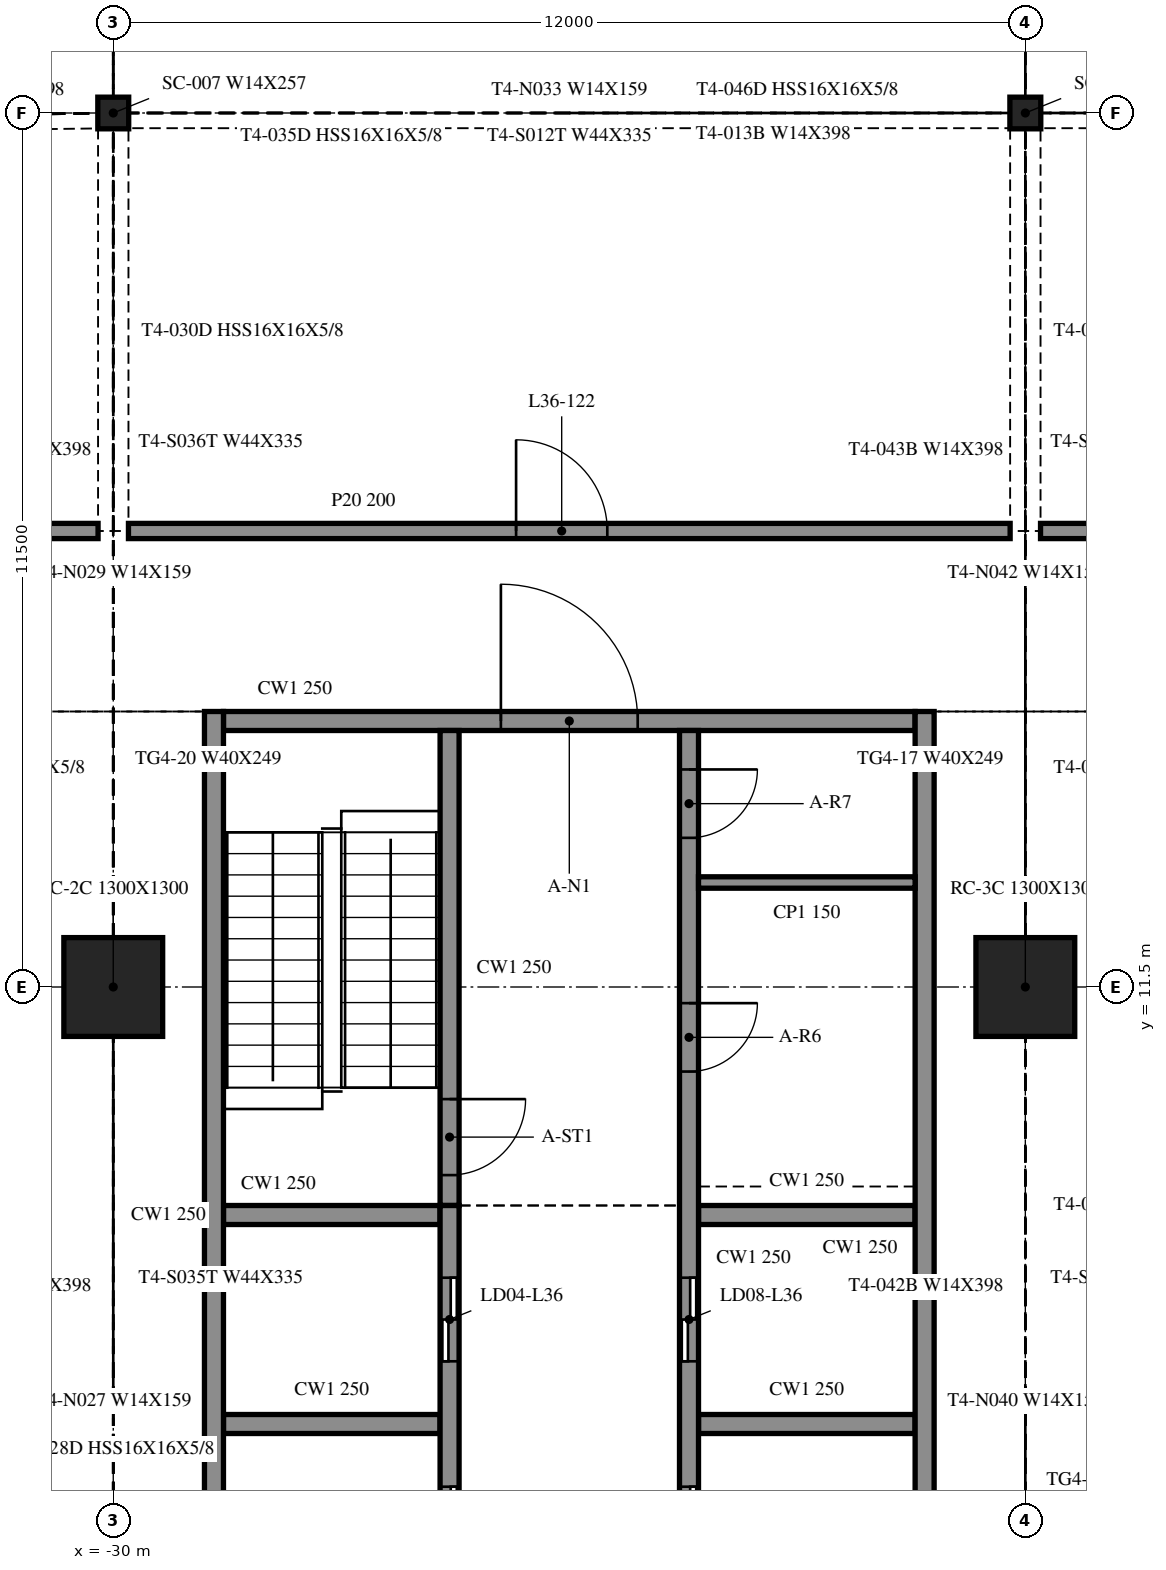
"""IFC4 building model, lengths in metres.
Left out: names, types, materials, properties, quantities, classifications, styles, units other than length and angle.
Written with IfcOpenShell. Run it as: python <this file> out.ifc"""

import sys

from ifc_helpers import new_model, si_unit, direction, frame, frame_2d, origin, origin_2d, place, context, subcontext, project, spatial, rectangle, i_section, extrude, element, fill, save


model = new_model("IFC4")
c1 = context("Model", 3, precision=1e-05, world=origin(), true_north=direction((0.0, 1.0)))
c2 = subcontext(c1, "Body", "Model", "MODEL_VIEW")
j1 = project(units=[si_unit("LENGTHUNIT", "METRE"), si_unit("PLANEANGLEUNIT", "RADIAN")], contexts=[c1])
p1 = place(None, origin())
s1 = spatial("IfcSite", under=j1, at=p1, CompositionType="ELEMENT")
p2 = place(p1, origin())
s2 = spatial("IfcBuilding", under=s1, at=p2, CompositionType="ELEMENT")
p3 = place(p2, frame((0.0, 0.0, 154.8)))
s3 = spatial("IfcBuildingStorey", under=s2, at=p3, CompositionType="ELEMENT", Elevation=154.8)
for number, where, z_axis, x_axis in (
    (1, (-30.0, 11.5, -0.55), (0.0, 0.0, 1.0), (1.0, 0.0, 0.0)),
    (2, (-18.0, 11.5, -0.55), (0.0, 0.0, 1.0), (1.0, 0.0, 0.0)),
):
    element("IfcColumn", number, at=place(p3, frame(where, z_axis=z_axis, x_axis=x_axis)), inside=s3, PredefinedType="COLUMN", context=c2, shape_type="SweptSolid", body=[
        extrude(rectangle(XDim=1.3, YDim=1.3, at=origin_2d()), origin(), (0.0, 0.0, 1.0), 4.61),
    ])
for number, where, z_axis, x_axis in (
    (3, (-18.0, 23.0, -0.55), (0.0, 0.0, 1.0), (1.0, 0.0, 0.0)),
    (4, (-30.0, 23.0, -0.55), (0.0, 0.0, 1.0), (1.0, 0.0, 0.0)),
):
    element("IfcColumn", number, at=place(p3, frame(where, z_axis=z_axis, x_axis=x_axis)), inside=s3, PredefinedType="COLUMN", context=c2, shape_type="SweptSolid", body=[
        extrude(i_section(OverallWidth=0.406, OverallDepth=0.417, WebThickness=0.03, FlangeThickness=0.048, at=origin_2d()), origin(), (0.0, 0.0, 1.0), 4.61),
    ])
for number, where, z_axis, x_axis in (
    (5, (-28.675, 15.125, 0.0), (0.0, 0.0, 1.0), (0.0, -1.0, 0.0)),
    (6, (-19.325, -9.125, 0.0), (0.0, 0.0, 1.0), (0.0, 1.0, 0.0)),
):
    element("IfcWall", number, at=place(p3, frame(where, z_axis=z_axis, x_axis=x_axis)), inside=s3, PredefinedType="SOLIDWALL", context=c2, shape_type="SweptSolid", body=[
        extrude(rectangle(XDim=24.25, YDim=0.25, at=frame_2d((12.125, 0.0))), origin(), (0.0, 0.0, 1.0), 4.06),
    ])
p4 = place(p3, frame((-28.55, 15.0, 0.0), z_axis=(0.0, 0.0, 1.0), x_axis=(1.0, 0.0, 0.0)))
e7 = element("IfcWall", 7, at=p4, inside=s3, PredefinedType="SOLIDWALL", context=c2, shape_type="SweptSolid", body=[
    extrude(rectangle(XDim=9.1, YDim=0.25, at=frame_2d((4.55, 0.0))), origin(), (0.0, 0.0, 1.0), 4.06),
])
p5 = place(p4, frame((3.65, 0.0, 0.0)))
e8 = element("IfcOpeningElement", 8, at=p5, cuts=e7, PredefinedType="OPENING", context=c2, shape_type="SweptSolid", body=[
    extrude(rectangle(XDim=1.8, YDim=2.1, at=frame_2d((0.9, 1.05))), frame((0.0, 0.135, 0.0), z_axis=(0.0, -1.0, 0.0), x_axis=(1.0, 0.0, 0.0)), (0.0, 0.0, 1.0), 0.27),
])
p6 = place(p3, frame((-25.575, -8.875, 0.0), z_axis=(0.0, 0.0, 1.0), x_axis=(0.0, 1.0, 0.0)))
e9 = element("IfcWall", 9, at=p6, inside=s3, PredefinedType="SOLIDWALL", context=c2, shape_type="SweptSolid", body=[
    extrude(rectangle(XDim=17.5, YDim=0.25, at=frame_2d((8.75, 0.0))), origin(), (0.0, 0.0, 1.0), 4.06),
])
p7 = place(p6, frame((7.2, 0.0, 0.0)))
e10 = element("IfcOpeningElement", 10, at=p7, cuts=e9, PredefinedType="OPENING", context=c2, shape_type="SweptSolid", body=[
    extrude(rectangle(XDim=1.1, YDim=2.1, at=frame_2d((0.55, 1.05))), frame((0.0, 0.135, 0.0), z_axis=(0.0, -1.0, 0.0), x_axis=(1.0, 0.0, 0.0)), (0.0, 0.0, 1.0), 0.27),
])
p8 = place(p6, frame((9.95, 0.0, 0.0)))
e11 = element("IfcOpeningElement", 11, at=p8, cuts=e9, PredefinedType="OPENING", context=c2, shape_type="SweptSolid", body=[
    extrude(rectangle(XDim=1.1, YDim=2.1, at=frame_2d((0.55, 1.05))), frame((0.0, 0.135, 0.0), z_axis=(0.0, -1.0, 0.0), x_axis=(1.0, 0.0, 0.0)), (0.0, 0.0, 1.0), 0.27),
])
p9 = place(p6, frame((12.7, 0.0, 0.0)))
e12 = element("IfcOpeningElement", 12, at=p9, cuts=e9, PredefinedType="OPENING", context=c2, shape_type="SweptSolid", body=[
    extrude(rectangle(XDim=1.1, YDim=2.1, at=frame_2d((0.55, 1.05))), frame((0.0, 0.135, 0.0), z_axis=(0.0, -1.0, 0.0), x_axis=(1.0, 0.0, 0.0)), (0.0, 0.0, 1.0), 0.27),
])
p10 = place(p6, frame((15.45, 0.0, 0.0)))
e13 = element("IfcOpeningElement", 13, at=p10, cuts=e9, PredefinedType="OPENING", context=c2, shape_type="SweptSolid", body=[
    extrude(rectangle(XDim=1.1, YDim=2.1, at=frame_2d((0.55, 1.05))), frame((0.0, 0.135, 0.0), z_axis=(0.0, -1.0, 0.0), x_axis=(1.0, 0.0, 0.0)), (0.0, 0.0, 1.0), 0.27),
])
p11 = place(p6, frame((0.512, 0.0, 0.0)))
e14 = element("IfcOpeningElement", 14, at=p11, cuts=e9, PredefinedType="OPENING", context=c2, shape_type="SweptSolid", body=[
    extrude(rectangle(XDim=0.9, YDim=2.1, at=frame_2d((0.45, 1.05))), frame((0.0, 0.135, 0.0), z_axis=(0.0, -1.0, 0.0), x_axis=(1.0, 0.0, 0.0)), (0.0, 0.0, 1.0), 0.27),
])
p12 = place(p6, frame((3.587, 0.0, 0.0)))
e15 = element("IfcOpeningElement", 15, at=p12, cuts=e9, PredefinedType="OPENING", context=c2, shape_type="SweptSolid", body=[
    extrude(rectangle(XDim=0.9, YDim=2.1, at=frame_2d((0.45, 1.05))), frame((0.0, 0.135, 0.0), z_axis=(0.0, -1.0, 0.0), x_axis=(1.0, 0.0, 0.0)), (0.0, 0.0, 1.0), 0.27),
])
p13 = place(p3, frame((-25.575, 14.875, 0.0), z_axis=(0.0, 0.0, 1.0), x_axis=(0.0, -1.0, 0.0)))
e16 = element("IfcWall", 16, at=p13, inside=s3, PredefinedType="SOLIDWALL", context=c2, shape_type="SweptSolid", body=[
    extrude(rectangle(XDim=6.25, YDim=0.25, at=frame_2d((3.125, 0.0))), origin(), (0.0, 0.0, 1.0), 4.06),
])
p14 = place(p13, frame((4.85, 0.0, 0.0)))
e17 = element("IfcOpeningElement", 17, at=p14, cuts=e16, PredefinedType="OPENING", context=c2, shape_type="SweptSolid", body=[
    extrude(rectangle(XDim=1.0, YDim=2.1, at=frame_2d((0.5, 1.05))), frame((0.0, 0.135, 0.0), z_axis=(0.0, -1.0, 0.0), x_axis=(1.0, 0.0, 0.0)), (0.0, 0.0, 1.0), 0.27),
])
p15 = place(p3, frame((-22.425, 14.875, 0.0), z_axis=(0.0, 0.0, 1.0), x_axis=(0.0, -1.0, 0.0)))
e18 = element("IfcWall", 18, at=p15, inside=s3, PredefinedType="SOLIDWALL", context=c2, shape_type="SweptSolid", body=[
    extrude(rectangle(XDim=23.75, YDim=0.25, at=frame_2d((11.875, 0.0))), origin(), (0.0, 0.0, 1.0), 4.06),
])
p16 = place(p15, frame((15.45, 0.0, 0.0)))
e19 = element("IfcOpeningElement", 19, at=p16, cuts=e18, PredefinedType="OPENING", context=c2, shape_type="SweptSolid", body=[
    extrude(rectangle(XDim=1.1, YDim=2.1, at=frame_2d((0.55, 1.05))), frame((0.0, 0.135, 0.0), z_axis=(0.0, -1.0, 0.0), x_axis=(1.0, 0.0, 0.0)), (0.0, 0.0, 1.0), 0.27),
])
p17 = place(p15, frame((12.7, 0.0, 0.0)))
e20 = element("IfcOpeningElement", 20, at=p17, cuts=e18, PredefinedType="OPENING", context=c2, shape_type="SweptSolid", body=[
    extrude(rectangle(XDim=1.1, YDim=2.1, at=frame_2d((0.55, 1.05))), frame((0.0, 0.135, 0.0), z_axis=(0.0, -1.0, 0.0), x_axis=(1.0, 0.0, 0.0)), (0.0, 0.0, 1.0), 0.27),
])
p18 = place(p15, frame((9.95, 0.0, 0.0)))
e21 = element("IfcOpeningElement", 21, at=p18, cuts=e18, PredefinedType="OPENING", context=c2, shape_type="SweptSolid", body=[
    extrude(rectangle(XDim=1.1, YDim=2.1, at=frame_2d((0.55, 1.05))), frame((0.0, 0.135, 0.0), z_axis=(0.0, -1.0, 0.0), x_axis=(1.0, 0.0, 0.0)), (0.0, 0.0, 1.0), 0.27),
])
p19 = place(p15, frame((7.2, 0.0, 0.0)))
e22 = element("IfcOpeningElement", 22, at=p19, cuts=e18, PredefinedType="OPENING", context=c2, shape_type="SweptSolid", body=[
    extrude(rectangle(XDim=1.1, YDim=2.1, at=frame_2d((0.55, 1.05))), frame((0.0, 0.135, 0.0), z_axis=(0.0, -1.0, 0.0), x_axis=(1.0, 0.0, 0.0)), (0.0, 0.0, 1.0), 0.27),
])
p20 = place(p15, frame((22.337, 0.0, 0.0)))
e23 = element("IfcOpeningElement", 23, at=p20, cuts=e18, PredefinedType="OPENING", context=c2, shape_type="SweptSolid", body=[
    extrude(rectangle(XDim=0.9, YDim=2.1, at=frame_2d((0.45, 1.05))), frame((0.0, 0.135, 0.0), z_axis=(0.0, -1.0, 0.0), x_axis=(1.0, 0.0, 0.0)), (0.0, 0.0, 1.0), 0.27),
])
p21 = place(p15, frame((20.3, 0.0, 0.0)))
e24 = element("IfcOpeningElement", 24, at=p21, cuts=e18, PredefinedType="OPENING", context=c2, shape_type="SweptSolid", body=[
    extrude(rectangle(XDim=0.9, YDim=2.1, at=frame_2d((0.45, 1.05))), frame((0.0, 0.135, 0.0), z_axis=(0.0, -1.0, 0.0), x_axis=(1.0, 0.0, 0.0)), (0.0, 0.0, 1.0), 0.27),
])
p22 = place(p15, frame((18.262, 0.0, 0.0)))
e25 = element("IfcOpeningElement", 25, at=p22, cuts=e18, PredefinedType="OPENING", context=c2, shape_type="SweptSolid", body=[
    extrude(rectangle(XDim=0.9, YDim=2.1, at=frame_2d((0.45, 1.05))), frame((0.0, 0.135, 0.0), z_axis=(0.0, -1.0, 0.0), x_axis=(1.0, 0.0, 0.0)), (0.0, 0.0, 1.0), 0.27),
])
p23 = place(p15, frame((3.587, 0.0, 0.0)))
e26 = element("IfcOpeningElement", 26, at=p23, cuts=e18, PredefinedType="OPENING", context=c2, shape_type="SweptSolid", body=[
    extrude(rectangle(XDim=0.9, YDim=2.1, at=frame_2d((0.45, 1.05))), frame((0.0, 0.135, 0.0), z_axis=(0.0, -1.0, 0.0), x_axis=(1.0, 0.0, 0.0)), (0.0, 0.0, 1.0), 0.27),
])
p24 = place(p15, frame((0.512, 0.0, 0.0)))
e27 = element("IfcOpeningElement", 27, at=p24, cuts=e18, PredefinedType="OPENING", context=c2, shape_type="SweptSolid", body=[
    extrude(rectangle(XDim=0.9, YDim=2.1, at=frame_2d((0.45, 1.05))), frame((0.0, 0.135, 0.0), z_axis=(0.0, -1.0, 0.0), x_axis=(1.0, 0.0, 0.0)), (0.0, 0.0, 1.0), 0.27),
])
for number, where, z_axis, x_axis in (
    (28, (-28.55, 5.75, 0.0), (0.0, 0.0, 1.0), (1.0, 0.0, 0.0)),
    (29, (-28.55, 8.5, 0.0), (0.0, 0.0, 1.0), (1.0, 0.0, 0.0)),
    (30, (-22.3, 5.75, 0.0), (0.0, 0.0, 1.0), (1.0, 0.0, 0.0)),
    (31, (-22.3, 8.5, 0.0), (0.0, 0.0, 1.0), (1.0, 0.0, 0.0)),
):
    element("IfcWall", number, at=place(p3, frame(where, z_axis=z_axis, x_axis=x_axis)), inside=s3, PredefinedType="SOLIDWALL", context=c2, shape_type="SweptSolid", body=[
        extrude(rectangle(XDim=2.85, YDim=0.25, at=frame_2d((1.425, 0.0))), origin(), (0.0, 0.0, 1.0), 4.06),
    ])
p25 = place(p3, frame((-22.3, 12.875, 0.0), z_axis=(0.0, 0.0, 1.0), x_axis=(1.0, 0.0, 0.0)))
e32 = element("IfcWall", 32, at=p25, inside=s3, PredefinedType="PARTITIONING", context=c2, shape_type="SweptSolid", body=[
    extrude(rectangle(XDim=2.85, YDim=0.15, at=frame_2d((1.425, 0.0))), origin(), (0.0, 0.0, 1.0), 4.06),
])
p26 = place(p3, frame((-45.372, 17.5, 0.0), z_axis=(0.0, 0.0, 1.0), x_axis=(1.0, 0.0, 0.0)))
e33 = element("IfcWall", 33, at=p26, inside=s3, PredefinedType="PARTITIONING", context=c2, shape_type="SweptSolid", body=[
    extrude(rectangle(XDim=15.172, YDim=0.2, at=frame_2d((7.586, 0.0))), origin(), (0.0, 0.0, 1.0), 4.06),
])
p27 = place(p26, frame((2.1, 0.0, 0.0)))
e34 = element("IfcOpeningElement", 34, at=p27, cuts=e33, PredefinedType="OPENING", context=c2, shape_type="SweptSolid", body=[
    extrude(rectangle(XDim=0.9, YDim=2.1, at=frame_2d((0.45, 1.05))), frame((0.0, 0.11, 0.0), z_axis=(0.0, -1.0, 0.0), x_axis=(1.0, 0.0, 0.0)), (0.0, 0.0, 1.0), 0.22),
])
p28 = place(p26, frame((6.9, 0.0, 0.0)))
e35 = element("IfcOpeningElement", 35, at=p28, cuts=e33, PredefinedType="OPENING", context=c2, shape_type="SweptSolid", body=[
    extrude(rectangle(XDim=1.2, YDim=2.1, at=frame_2d((0.6, 1.05))), frame((0.0, 0.11, 0.0), z_axis=(0.0, -1.0, 0.0), x_axis=(1.0, 0.0, 0.0)), (0.0, 0.0, 1.0), 0.22),
])
p29 = place(p3, frame((-29.8, 17.5, 0.0), z_axis=(0.0, 0.0, 1.0), x_axis=(1.0, 0.0, 0.0)))
e36 = element("IfcWall", 36, at=p29, inside=s3, PredefinedType="PARTITIONING", context=c2, shape_type="SweptSolid", body=[
    extrude(rectangle(XDim=11.6, YDim=0.2, at=frame_2d((5.8, 0.0))), origin(), (0.0, 0.0, 1.0), 4.06),
])
p30 = place(p29, frame((5.1, 0.0, 0.0)))
e37 = element("IfcOpeningElement", 37, at=p30, cuts=e36, PredefinedType="OPENING", context=c2, shape_type="SweptSolid", body=[
    extrude(rectangle(XDim=1.2, YDim=2.1, at=frame_2d((0.6, 1.05))), frame((0.0, 0.11, 0.0), z_axis=(0.0, -1.0, 0.0), x_axis=(1.0, 0.0, 0.0)), (0.0, 0.0, 1.0), 0.22),
])
p31 = place(p3, frame((-17.8, 17.5, 0.0), z_axis=(0.0, 0.0, 1.0), x_axis=(1.0, 0.0, 0.0)))
e38 = element("IfcWall", 38, at=p31, inside=s3, PredefinedType="PARTITIONING", context=c2, shape_type="SweptSolid", body=[
    extrude(rectangle(XDim=11.6, YDim=0.2, at=frame_2d((5.8, 0.0))), origin(), (0.0, 0.0, 1.0), 4.06),
])
p32 = place(p31, frame((5.1, 0.0, 0.0)))
e39 = element("IfcOpeningElement", 39, at=p32, cuts=e38, PredefinedType="OPENING", context=c2, shape_type="SweptSolid", body=[
    extrude(rectangle(XDim=1.2, YDim=2.1, at=frame_2d((0.6, 1.05))), frame((0.0, 0.11, 0.0), z_axis=(0.0, -1.0, 0.0), x_axis=(1.0, 0.0, 0.0)), (0.0, 0.0, 1.0), 0.22),
])
p33 = place(p5, origin())
e40 = element("IfcDoor", 40, at=p33, inside=s3, OperationType="DOUBLE_DOOR_SINGLE_SWING", PredefinedType="DOOR", context=c2, shape_type="SweptSolid", body=[
    extrude(rectangle(XDim=1.8, YDim=2.1, at=frame_2d((0.9, 1.05))), frame((0.0, 0.025, 0.0), z_axis=(0.0, -1.0, 0.0), x_axis=(1.0, 0.0, 0.0)), (0.0, 0.0, 1.0), 0.05),
])
fill(e8, e40)
p34 = place(p18, origin())
e41 = element("IfcDoor", 41, at=p34, inside=s3, OperationType="DOUBLE_DOOR_SLIDING", PredefinedType="DOOR", context=c2, shape_type="SweptSolid", body=[
    extrude(rectangle(XDim=1.1, YDim=2.1, at=frame_2d((0.55, 1.05))), frame((0.0, 0.025, 0.0), z_axis=(0.0, -1.0, 0.0), x_axis=(1.0, 0.0, 0.0)), (0.0, 0.0, 1.0), 0.05),
])
fill(e21, e41)
p35 = place(p19, origin())
e42 = element("IfcDoor", 42, at=p35, inside=s3, OperationType="DOUBLE_DOOR_SLIDING", PredefinedType="DOOR", context=c2, shape_type="SweptSolid", body=[
    extrude(rectangle(XDim=1.1, YDim=2.1, at=frame_2d((0.55, 1.05))), frame((0.0, 0.025, 0.0), z_axis=(0.0, -1.0, 0.0), x_axis=(1.0, 0.0, 0.0)), (0.0, 0.0, 1.0), 0.05),
])
fill(e22, e42)
p36 = place(p9, origin())
e43 = element("IfcDoor", 43, at=p36, inside=s3, OperationType="DOUBLE_DOOR_SLIDING", PredefinedType="DOOR", context=c2, shape_type="SweptSolid", body=[
    extrude(rectangle(XDim=1.1, YDim=2.1, at=frame_2d((0.55, 1.05))), frame((0.0, 0.025, 0.0), z_axis=(0.0, -1.0, 0.0), x_axis=(1.0, 0.0, 0.0)), (0.0, 0.0, 1.0), 0.05),
])
fill(e12, e43)
p37 = place(p10, origin())
e44 = element("IfcDoor", 44, at=p37, inside=s3, OperationType="DOUBLE_DOOR_SLIDING", PredefinedType="DOOR", context=c2, shape_type="SweptSolid", body=[
    extrude(rectangle(XDim=1.1, YDim=2.1, at=frame_2d((0.55, 1.05))), frame((0.0, 0.025, 0.0), z_axis=(0.0, -1.0, 0.0), x_axis=(1.0, 0.0, 0.0)), (0.0, 0.0, 1.0), 0.05),
])
fill(e13, e44)
p38 = place(p23, origin())
e45 = element("IfcDoor", 45, at=p38, inside=s3, OperationType="SINGLE_SWING_RIGHT", PredefinedType="DOOR", context=c2, shape_type="SweptSolid", body=[
    extrude(rectangle(XDim=0.9, YDim=2.1, at=frame_2d((0.45, 1.05))), frame((0.0, 0.025, 0.0), z_axis=(0.0, -1.0, 0.0), x_axis=(1.0, 0.0, 0.0)), (0.0, 0.0, 1.0), 0.05),
])
fill(e26, e45)
p39 = place(p24, origin())
e46 = element("IfcDoor", 46, at=p39, inside=s3, OperationType="SINGLE_SWING_LEFT", PredefinedType="DOOR", context=c2, shape_type="SweptSolid", body=[
    extrude(rectangle(XDim=0.9, YDim=2.1, at=frame_2d((0.45, 1.05))), frame((0.0, 0.025, 0.0), z_axis=(0.0, -1.0, 0.0), x_axis=(1.0, 0.0, 0.0)), (0.0, 0.0, 1.0), 0.05),
])
fill(e27, e46)
p40 = place(p14, origin())
e47 = element("IfcDoor", 47, at=p40, inside=s3, OperationType="SINGLE_SWING_RIGHT", PredefinedType="DOOR", context=c2, shape_type="SweptSolid", body=[
    extrude(rectangle(XDim=1.0, YDim=2.1, at=frame_2d((0.5, 1.05))), frame((0.0, 0.025, 0.0), z_axis=(0.0, -1.0, 0.0), x_axis=(1.0, 0.0, 0.0)), (0.0, 0.0, 1.0), 0.05),
])
fill(e17, e47)
p41 = place(p30, origin())
e48 = element("IfcDoor", 48, at=p41, inside=s3, OperationType="SINGLE_SWING_LEFT", PredefinedType="DOOR", context=c2, shape_type="SweptSolid", body=[
    extrude(rectangle(XDim=1.2, YDim=2.1, at=frame_2d((0.6, 1.05))), frame((0.0, 0.025, 0.0), z_axis=(0.0, -1.0, 0.0), x_axis=(1.0, 0.0, 0.0)), (0.0, 0.0, 1.0), 0.05),
])
fill(e37, e48)
save(model, sys.argv[1])
